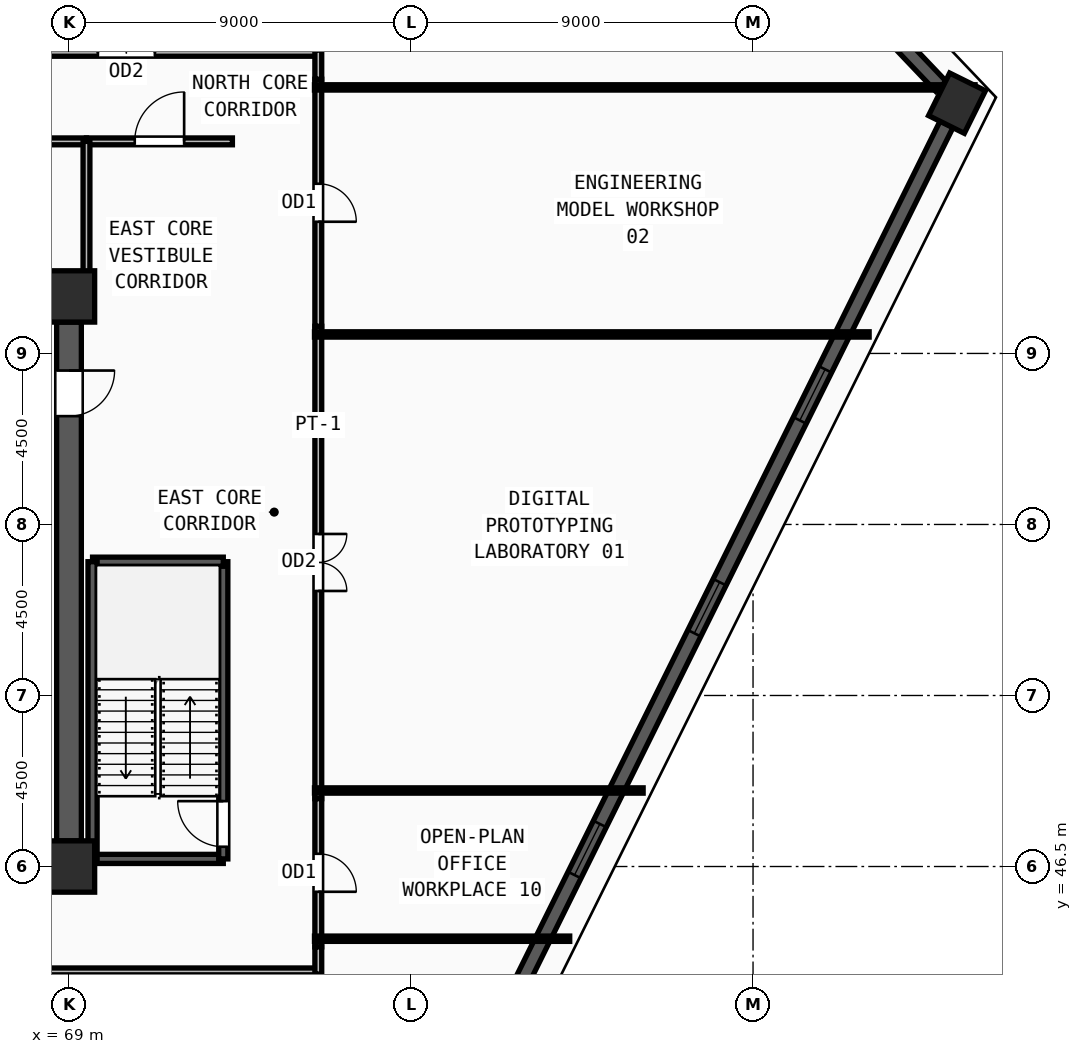
"""IFC4 building model, lengths in metres.
Left out: names, types, materials, properties, quantities, classifications, styles, units other than length and angle.
Written with IfcOpenShell. Run it as: python <this file> out.ifc"""

import sys

from ifc_helpers import new_model, si_unit, direction, frame, frame_2d, origin, origin_2d, place, context, subcontext, project, spatial, rectangle, extrude, source, transform, mapped, element, fill, save


model = new_model("IFC4")
c1 = context("Model", 3, precision=1e-05, world=origin(), true_north=direction((0.0, 1.0)))
c2 = subcontext(c1, "Body", "Model", "MODEL_VIEW")
j1 = project(units=[si_unit("LENGTHUNIT", "METRE"), si_unit("PLANEANGLEUNIT", "RADIAN")], contexts=[c1])
p1 = place(None, origin())
s1 = spatial("IfcSite", under=j1, at=p1, CompositionType="ELEMENT")
p2 = place(p1, origin())
s2 = spatial("IfcBuilding", under=s1, at=p2, CompositionType="ELEMENT")
p3 = place(p2, frame((0.0, 0.0, 236.25)))
s3 = spatial("IfcBuildingStorey", under=s2, at=p3, CompositionType="ELEMENT", Elevation=236.25)
m1 = source(origin(), c2, "Body", "SweptSolid", [
    extrude(rectangle(XDim=1.35, YDim=1.35, at=origin_2d()), origin(), (0.0, 0.0, 1.0), 3.75),
])
for number, where, z_axis, x_axis in (
    (1, (69.0, 46.5, 0.0), (0.0, 0.0, 1.0), (1.0, 0.0, 0.0)),
    (2, (69.0, 61.5, 0.0), (0.0, 0.0, 1.0), (1.0, 0.0, 0.0)),
):
    element("IfcColumn", number, at=place(p3, frame(where, z_axis=z_axis, x_axis=x_axis)), inside=s3, PredefinedType="COLUMN", context=c2, shape_type="MappedRepresentation", body=[
        mapped(m1, transform((0.0, 0.0, 0.0), x_axis=(1.0, 0.0, 0.0), y_axis=(0.0, 1.0, 0.0), z_axis=(0.0, 0.0, 1.0), scale=1.0)),
    ])
m2 = source(origin(), c2, "Body", "SweptSolid", [
    extrude(rectangle(XDim=1.25, YDim=1.05, at=origin_2d()), origin(), (0.0, 0.0, 1.0), 3.75),
])
p4 = place(p3, frame((92.367, 66.585, 0.0), z_axis=(0.0, 0.0, 1.0), x_axis=(0.444009746106, 0.896021955849, 0.0)))
e3 = element("IfcColumn", 3, at=p4, inside=s3, PredefinedType="COLUMN", context=c2, shape_type="MappedRepresentation", body=[
    mapped(m2, transform((0.0, 0.0, 0.0), x_axis=(1.0, 0.0, 0.0), y_axis=(0.0, 1.0, 0.0), z_axis=(0.0, 0.0, 1.0), scale=1.0)),
])
p5 = place(p3, frame((79.483, 40.585, 0.0), z_axis=(0.0, 0.0, 1.0), x_axis=(0.444016540866, 0.896018588779, 0.0)))
e4 = element("IfcWall", 4, at=p5, inside=s3, PredefinedType="SOLIDWALL", context=c2, shape_type="SweptSolid", body=[
    extrude(rectangle(XDim=28.402, YDim=0.38, at=frame_2d((14.201, 0.0))), origin(), (0.0, 0.0, 1.0), 3.57),
])
m3 = source(origin(), c2, "Body", "SweptSolid", [
    extrude(rectangle(XDim=1.5, YDim=1.9, at=frame_2d((0.75, 0.95))), frame((0.0, 0.2, 0.0), z_axis=(0.0, -1.0, 0.0), x_axis=(1.0, 0.0, 0.0)), (0.0, 0.0, 1.0), 0.4),
])
p6 = place(p5, frame((6.351, 0.0, 0.55)))
e5 = element("IfcOpeningElement", 5, at=p6, cuts=e4, PredefinedType="OPENING", context=c2, shape_type="MappedRepresentation", body=[
    mapped(m3, transform((0.0, 0.0, 0.0), x_axis=(1.0, 0.0, 0.0), y_axis=(0.0, 1.0, 0.0), z_axis=(0.0, 0.0, 1.0), scale=1.0)),
])
p7 = place(p5, frame((13.451, 0.0, 0.55)))
e6 = element("IfcOpeningElement", 6, at=p7, cuts=e4, PredefinedType="OPENING", context=c2, shape_type="MappedRepresentation", body=[
    mapped(m3, transform((0.0, 0.0, 0.0), x_axis=(1.0, 0.0, 0.0), y_axis=(0.0, 1.0, 0.0), z_axis=(0.0, 0.0, 1.0), scale=1.0)),
])
p8 = place(p5, frame((19.702, 0.0, 0.55)))
e7 = element("IfcOpeningElement", 7, at=p8, cuts=e4, PredefinedType="OPENING", context=c2, shape_type="MappedRepresentation", body=[
    mapped(m3, transform((0.0, 0.0, 0.0), x_axis=(1.0, 0.0, 0.0), y_axis=(0.0, 1.0, 0.0), z_axis=(0.0, 0.0, 1.0), scale=1.0)),
])
p9 = place(p3, frame((91.943, 67.031, 0.0), z_axis=(0.0, 0.0, 1.0), x_axis=(-0.689450799111, 0.724332517291, 0.0)))
e8 = element("IfcWall", 8, at=p9, inside=s3, PredefinedType="SOLIDWALL", context=c2, shape_type="SweptSolid", body=[
    extrude(rectangle(XDim=4.207, YDim=0.38, at=frame_2d((2.103, 0.0))), origin(), (0.0, 0.0, 1.0), 3.57),
])
m4 = source(origin(), c2, "Body", "SweptSolid", [
    extrude(rectangle(XDim=1.2, YDim=1.9, at=frame_2d((0.6, 0.95))), frame((0.0, 0.2, 0.0), z_axis=(0.0, -1.0, 0.0), x_axis=(1.0, 0.0, 0.0)), (0.0, 0.0, 1.0), 0.4),
])
p10 = place(p9, frame((1.503, 0.0, 0.55)))
e9 = element("IfcOpeningElement", 9, at=p10, cuts=e8, PredefinedType="OPENING", context=c2, shape_type="MappedRepresentation", body=[
    mapped(m4, transform((0.0, 0.0, 0.0), x_axis=(1.0, 0.0, 0.0), y_axis=(0.0, 1.0, 0.0), z_axis=(0.0, 0.0, 1.0), scale=1.0)),
])
p11 = place(p3, frame((69.0, 60.825, 0.0), z_axis=(0.0, 0.0, 1.0), x_axis=(0.0, -1.0, 0.0)))
e10 = element("IfcWall", 10, at=p11, inside=s3, PredefinedType="SHEAR", context=c2, shape_type="SweptSolid", body=[
    extrude(rectangle(XDim=13.65, YDim=0.65, at=frame_2d((6.825, 0.0))), origin(), (0.0, 0.0, 1.0), 3.57),
])
m5 = source(origin(), c2, "Body", "SweptSolid", [
    extrude(rectangle(XDim=1.2, YDim=2.2, at=frame_2d((0.6, 1.1))), frame((0.0, 0.335, 0.0), z_axis=(0.0, -1.0, 0.0), x_axis=(1.0, 0.0, 0.0)), (0.0, 0.0, 1.0), 0.67),
])
p12 = place(p11, frame((1.275, 0.0, 0.0)))
e11 = element("IfcOpeningElement", 11, at=p12, cuts=e10, PredefinedType="OPENING", context=c2, shape_type="MappedRepresentation", body=[
    mapped(m5, transform((0.0, 0.0, 0.0), x_axis=(1.0, 0.0, 0.0), y_axis=(0.0, 1.0, 0.0), z_axis=(0.0, 0.0, 1.0), scale=1.0)),
])
p13 = place(p3, frame((69.62, 46.7, 0.0), z_axis=(0.0, 0.0, 1.0), x_axis=(1.0, 0.0, 0.0)))
e12 = element("IfcWall", 12, at=p13, inside=s3, PredefinedType="SOLIDWALL", context=c2, shape_type="SweptSolid", body=[
    extrude(rectangle(XDim=3.44, YDim=0.24, at=frame_2d((1.72, 0.0))), origin(), (0.0, 0.0, 1.0), 3.57),
])
p14 = place(p3, frame((73.06, 46.7, 0.0), z_axis=(0.0, 0.0, 1.0), x_axis=(0.0, 1.0, 0.0)))
e13 = element("IfcWall", 13, at=p14, inside=s3, PredefinedType="SOLIDWALL", context=c2, shape_type="SweptSolid", body=[
    extrude(rectangle(XDim=7.82, YDim=0.24, at=frame_2d((3.91, 0.0))), origin(), (0.0, 0.0, 1.0), 3.57),
])
m6 = source(origin(), c2, "Body", "SweptSolid", [
    extrude(rectangle(XDim=1.2, YDim=2.2, at=frame_2d((0.6, 1.1))), frame((0.0, 0.13, 0.0), z_axis=(0.0, -1.0, 0.0), x_axis=(1.0, 0.0, 0.0)), (0.0, 0.0, 1.0), 0.26),
])
p15 = place(p14, frame((0.32, 0.0, 0.0)))
e14 = element("IfcOpeningElement", 14, at=p15, cuts=e13, PredefinedType="OPENING", context=c2, shape_type="MappedRepresentation", body=[
    mapped(m6, transform((0.0, 0.0, 0.0), x_axis=(1.0, 0.0, 0.0), y_axis=(0.0, 1.0, 0.0), z_axis=(0.0, 0.0, 1.0), scale=1.0)),
])
p16 = place(p3, frame((73.06, 54.52, 0.0), z_axis=(0.0, 0.0, 1.0), x_axis=(-1.0, 0.0, 0.0)))
e15 = element("IfcWall", 15, at=p16, inside=s3, PredefinedType="SOLIDWALL", context=c2, shape_type="SweptSolid", body=[
    extrude(rectangle(XDim=3.44, YDim=0.24, at=frame_2d((1.72, 0.0))), origin(), (0.0, 0.0, 1.0), 3.57),
])
p17 = place(p3, frame((69.62, 54.52, 0.0), z_axis=(0.0, 0.0, 1.0), x_axis=(0.0, -1.0, 0.0)))
e16 = element("IfcWall", 16, at=p17, inside=s3, PredefinedType="SOLIDWALL", context=c2, shape_type="SweptSolid", body=[
    extrude(rectangle(XDim=7.82, YDim=0.24, at=frame_2d((3.91, 0.0))), origin(), (0.0, 0.0, 1.0), 3.57),
])
p18 = place(p3, frame((62.39, 65.58, 0.0), z_axis=(0.0, 0.0, 1.0), x_axis=(1.0, 0.0, 0.0)))
e17 = element("IfcWall", 17, at=p18, inside=s3, PredefinedType="PARTITIONING", context=c2, shape_type="SweptSolid", body=[
    extrude(rectangle(XDim=7.07, YDim=0.18, at=frame_2d((3.535, 0.0))), origin(), (0.0, 0.0, 1.0), 3.57),
])
m7 = source(origin(), c2, "Body", "SweptSolid", [
    extrude(rectangle(XDim=1.0, YDim=2.2, at=frame_2d((0.5, 1.1))), frame((0.0, 0.1, 0.0), z_axis=(0.0, -1.0, 0.0), x_axis=(1.0, 0.0, 0.0)), (0.0, 0.0, 1.0), 0.2),
])
p19 = place(p18, frame((3.035, 0.0, 0.0)))
e18 = element("IfcOpeningElement", 18, at=p19, cuts=e17, PredefinedType="OPENING", context=c2, shape_type="MappedRepresentation", body=[
    mapped(m7, transform((0.0, 0.0, 0.0), x_axis=(1.0, 0.0, 0.0), y_axis=(0.0, 1.0, 0.0), z_axis=(0.0, 0.0, 1.0), scale=1.0)),
])
p20 = place(p3, frame((69.46, 65.58, 0.0), z_axis=(0.0, 0.0, 1.0), x_axis=(1.0, 0.0, 0.0)))
e19 = element("IfcWall", 19, at=p20, inside=s3, PredefinedType="PARTITIONING", context=c2, shape_type="SweptSolid", body=[
    extrude(rectangle(XDim=3.84, YDim=0.18, at=frame_2d((1.92, 0.0))), origin(), (0.0, 0.0, 1.0), 3.57),
])
m8 = source(origin(), c2, "Body", "SweptSolid", [
    extrude(rectangle(XDim=1.3, YDim=2.2, at=frame_2d((0.65, 1.1))), frame((0.0, 0.1, 0.0), z_axis=(0.0, -1.0, 0.0), x_axis=(1.0, 0.0, 0.0)), (0.0, 0.0, 1.0), 0.2),
])
p21 = place(p20, frame((1.27, 0.0, 0.0)))
e20 = element("IfcOpeningElement", 20, at=p21, cuts=e19, PredefinedType="OPENING", context=c2, shape_type="MappedRepresentation", body=[
    mapped(m8, transform((0.0, 0.0, 0.0), x_axis=(1.0, 0.0, 0.0), y_axis=(0.0, 1.0, 0.0), z_axis=(0.0, 0.0, 1.0), scale=1.0)),
])
p22 = place(p3, frame((75.56, 60.715, 0.0), z_axis=(0.0, 0.0, 1.0), x_axis=(0.0, -1.0, 0.0)))
e21 = element("IfcWall", 21, at=p22, inside=s3, PredefinedType="PARTITIONING", context=c2, shape_type="SweptSolid", body=[
    extrude(rectangle(XDim=12.43, YDim=0.18, at=frame_2d((6.215, 0.0))), origin(), (0.0, 0.0, 1.0), 3.57),
])
m9 = source(origin(), c2, "Body", "SweptSolid", [
    extrude(rectangle(XDim=1.5, YDim=2.2, at=frame_2d((0.75, 1.1))), frame((0.0, 0.1, 0.0), z_axis=(0.0, -1.0, 0.0), x_axis=(1.0, 0.0, 0.0)), (0.0, 0.0, 1.0), 0.2),
])
p23 = place(p22, frame((5.465, 0.0, 0.0)))
e22 = element("IfcOpeningElement", 22, at=p23, cuts=e21, PredefinedType="OPENING", context=c2, shape_type="MappedRepresentation", body=[
    mapped(m9, transform((0.0, 0.0, 0.0), x_axis=(1.0, 0.0, 0.0), y_axis=(0.0, 1.0, 0.0), z_axis=(0.0, 0.0, 1.0), scale=1.0)),
])
p24 = place(p3, frame((75.56, 67.215, 0.0), z_axis=(0.0, 0.0, 1.0), x_axis=(0.0, -1.0, 0.0)))
e23 = element("IfcWall", 23, at=p24, inside=s3, PredefinedType="PARTITIONING", context=c2, shape_type="SweptSolid", body=[
    extrude(rectangle(XDim=6.5, YDim=0.18, at=frame_2d((3.25, 0.0))), origin(), (0.0, 0.0, 1.0), 3.57),
])
p25 = place(p24, frame((2.75, 0.0, 0.0)))
e24 = element("IfcOpeningElement", 24, at=p25, cuts=e23, PredefinedType="OPENING", context=c2, shape_type="MappedRepresentation", body=[
    mapped(m7, transform((0.0, 0.0, 0.0), x_axis=(1.0, 0.0, 0.0), y_axis=(0.0, 1.0, 0.0), z_axis=(0.0, 0.0, 1.0), scale=1.0)),
])
p26 = place(p3, frame((65.39, 67.91, 0.0), z_axis=(0.0, 0.0, 1.0), x_axis=(1.0, 0.0, 0.0)))
e25 = element("IfcWall", 25, at=p26, inside=s3, PredefinedType="PARTITIONING", context=c2, shape_type="SweptSolid", body=[
    extrude(rectangle(XDim=10.24, YDim=0.18, at=frame_2d((5.12, 0.0))), origin(), (0.0, 0.0, 1.0), 3.205),
])
p27 = place(p26, frame((4.37, 0.0, 0.0)))
e26 = element("IfcOpeningElement", 26, at=p27, cuts=e25, PredefinedType="OPENING", context=c2, shape_type="MappedRepresentation", body=[
    mapped(m9, transform((0.0, 0.0, 0.0), x_axis=(1.0, 0.0, 0.0), y_axis=(0.0, 1.0, 0.0), z_axis=(0.0, 0.0, 1.0), scale=1.0)),
])
p28 = place(p3, frame((75.63, 43.74, 0.0), z_axis=(0.0, 0.0, 1.0), x_axis=(-1.0, 0.0, 0.0)))
e27 = element("IfcWall", 27, at=p28, inside=s3, PredefinedType="PARTITIONING", context=c2, shape_type="SweptSolid", body=[
    extrude(rectangle(XDim=31.26, YDim=0.18, at=frame_2d((15.63, 0.0))), origin(), (0.0, 0.0, 1.0), 3.57),
])
p29 = place(p28, frame((10.38, 0.0, 0.0)))
e28 = element("IfcOpeningElement", 28, at=p29, cuts=e27, PredefinedType="OPENING", context=c2, shape_type="MappedRepresentation", body=[
    mapped(m9, transform((0.0, 0.0, 0.0), x_axis=(1.0, 0.0, 0.0), y_axis=(0.0, 1.0, 0.0), z_axis=(0.0, 0.0, 1.0), scale=1.0)),
])
p30 = place(p3, frame((75.56, 48.285, 0.0), z_axis=(0.0, 0.0, 1.0), x_axis=(0.0, -1.0, 0.0)))
e29 = element("IfcWall", 29, at=p30, inside=s3, PredefinedType="PARTITIONING", context=c2, shape_type="SweptSolid", body=[
    extrude(rectangle(XDim=3.9, YDim=0.18, at=frame_2d((1.95, 0.0))), origin(), (0.0, 0.0, 1.0), 3.57),
])
p31 = place(p30, frame((1.45, 0.0, 0.0)))
e30 = element("IfcOpeningElement", 30, at=p31, cuts=e29, PredefinedType="OPENING", context=c2, shape_type="MappedRepresentation", body=[
    mapped(m7, transform((0.0, 0.0, 0.0), x_axis=(1.0, 0.0, 0.0), y_axis=(0.0, 1.0, 0.0), z_axis=(0.0, 0.0, 1.0), scale=1.0)),
])
p32 = place(p3, frame((69.46, 61.95, 0.0), z_axis=(0.0, 0.0, 1.0), x_axis=(0.0, 1.0, 0.0)))
e31 = element("IfcWall", 31, at=p32, inside=s3, PredefinedType="PARTITIONING", context=c2, shape_type="SweptSolid", body=[
    extrude(rectangle(XDim=3.63, YDim=0.18, at=frame_2d((1.815, 0.0))), origin(), (0.0, 0.0, 1.0), 3.57),
])
p33 = place(p3, frame((75.56, 67.98, 0.0), z_axis=(0.0, 0.0, 1.0), x_axis=(0.0, -1.0, 0.0)))
e32 = element("IfcWall", 32, at=p33, inside=s3, PredefinedType="PARTITIONING", context=c2, shape_type="SweptSolid", body=[
    extrude(rectangle(XDim=0.765, YDim=0.18, at=frame_2d((0.382, 0.0))), origin(), (0.0, 0.0, 1.0), 3.57),
])
p34 = place(p3, frame((75.56, 44.385, 0.0), z_axis=(0.0, 0.0, 1.0), x_axis=(0.0, -1.0, 0.0)))
e33 = element("IfcWall", 33, at=p34, inside=s3, PredefinedType="PARTITIONING", context=c2, shape_type="SweptSolid", body=[
    extrude(rectangle(XDim=0.715, YDim=0.18, at=frame_2d((0.357, 0.0))), origin(), (0.0, 0.0, 1.0), 3.57),
])
p35 = place(p3, frame((75.46, 44.6, 0.0), z_axis=(0.0, 0.0, 1.0), x_axis=(1.0, 0.0, 0.0)))
e34 = element("IfcWall", 34, at=p35, inside=s3, PredefinedType="PARTITIONING", context=c2, shape_type="SweptSolid", body=[
    extrude(rectangle(XDim=6.716, YDim=0.14, at=frame_2d((3.358, 0.0))), origin(), (0.0, 0.0, 1.0), 3.57),
])
p36 = place(p3, frame((75.46, 48.5, 0.0), z_axis=(0.0, 0.0, 1.0), x_axis=(1.0, 0.0, 0.0)))
e35 = element("IfcWall", 35, at=p36, inside=s3, PredefinedType="PARTITIONING", context=c2, shape_type="SweptSolid", body=[
    extrude(rectangle(XDim=8.648, YDim=0.14, at=frame_2d((4.324, 0.0))), origin(), (0.0, 0.0, 1.0), 3.57),
])
p37 = place(p3, frame((75.46, 60.5, 0.0), z_axis=(0.0, 0.0, 1.0), x_axis=(1.0, 0.0, 0.0)))
e36 = element("IfcWall", 36, at=p37, inside=s3, PredefinedType="PARTITIONING", context=c2, shape_type="SweptSolid", body=[
    extrude(rectangle(XDim=14.595, YDim=0.14, at=frame_2d((7.297, 0.0))), origin(), (0.0, 0.0, 1.0), 3.57),
])
p38 = place(p3, frame((75.46, 67.0, 0.0), z_axis=(0.0, 0.0, 1.0), x_axis=(1.0, 0.0, 0.0)))
e37 = element("IfcWall", 37, at=p38, inside=s3, PredefinedType="PARTITIONING", context=c2, shape_type="SweptSolid", body=[
    extrude(rectangle(XDim=17.382, YDim=0.14, at=frame_2d((8.691, 0.0))), origin(), (0.0, 0.0, 1.0), 3.57),
])
m10 = source(origin(), c2, "Body", "SweptSolid", [
    extrude(rectangle(XDim=1.5, YDim=1.9, at=frame_2d((0.75, 0.95))), frame((0.0, 0.03, 0.0), z_axis=(0.0, -1.0, 0.0), x_axis=(1.0, 0.0, 0.0)), (0.0, 0.0, 1.0), 0.06),
])
p39 = place(p6, origin())
e38 = element("IfcWindow", 38, at=p39, inside=s3, PartitioningType="DOUBLE_PANEL_VERTICAL", PredefinedType="WINDOW", context=c2, shape_type="MappedRepresentation", body=[
    mapped(m10, transform((0.0, 0.0, 0.0), x_axis=(1.0, 0.0, 0.0), y_axis=(0.0, 1.0, 0.0), z_axis=(0.0, 0.0, 1.0), scale=1.0)),
])
fill(e5, e38)
p40 = place(p7, origin())
e39 = element("IfcWindow", 39, at=p40, inside=s3, PartitioningType="DOUBLE_PANEL_VERTICAL", PredefinedType="WINDOW", context=c2, shape_type="MappedRepresentation", body=[
    mapped(m10, transform((0.0, 0.0, 0.0), x_axis=(1.0, 0.0, 0.0), y_axis=(0.0, 1.0, 0.0), z_axis=(0.0, 0.0, 1.0), scale=1.0)),
])
fill(e6, e39)
p41 = place(p8, origin())
e40 = element("IfcWindow", 40, at=p41, inside=s3, PartitioningType="DOUBLE_PANEL_VERTICAL", PredefinedType="WINDOW", context=c2, shape_type="MappedRepresentation", body=[
    mapped(m10, transform((0.0, 0.0, 0.0), x_axis=(1.0, 0.0, 0.0), y_axis=(0.0, 1.0, 0.0), z_axis=(0.0, 0.0, 1.0), scale=1.0)),
])
fill(e7, e40)
m11 = source(origin(), c2, "Body", "SweptSolid", [
    extrude(rectangle(XDim=1.2, YDim=2.2, at=frame_2d((0.6, 1.1))), frame((0.0, 0.025, 0.0), z_axis=(0.0, -1.0, 0.0), x_axis=(1.0, 0.0, 0.0)), (0.0, 0.0, 1.0), 0.05),
])
p42 = place(p12, origin())
e41 = element("IfcDoor", 41, at=p42, inside=s3, OperationType="SINGLE_SWING_LEFT", PredefinedType="DOOR", context=c2, shape_type="MappedRepresentation", body=[
    mapped(m11, transform((0.0, 0.0, 0.0), x_axis=(1.0, 0.0, 0.0), y_axis=(0.0, 1.0, 0.0), z_axis=(0.0, 0.0, 1.0), scale=1.0)),
])
fill(e11, e41)
p43 = place(p15, origin())
e42 = element("IfcDoor", 42, at=p43, inside=s3, OperationType="SINGLE_SWING_RIGHT", PredefinedType="DOOR", context=c2, shape_type="MappedRepresentation", body=[
    mapped(m11, transform((0.0, 0.0, 0.0), x_axis=(1.0, 0.0, 0.0), y_axis=(0.0, 1.0, 0.0), z_axis=(0.0, 0.0, 1.0), scale=1.0)),
])
fill(e14, e42)
m12 = source(origin(), c2, "Body", "SweptSolid", [
    extrude(rectangle(XDim=1.3, YDim=2.2, at=frame_2d((0.65, 1.1))), frame((0.0, 0.025, 0.0), z_axis=(0.0, -1.0, 0.0), x_axis=(1.0, 0.0, 0.0)), (0.0, 0.0, 1.0), 0.05),
])
p44 = place(p21, origin())
e43 = element("IfcDoor", 43, at=p44, inside=s3, OperationType="SINGLE_SWING_RIGHT", PredefinedType="DOOR", context=c2, shape_type="MappedRepresentation", body=[
    mapped(m12, transform((0.0, 0.0, 0.0), x_axis=(1.0, 0.0, 0.0), y_axis=(0.0, 1.0, 0.0), z_axis=(0.0, 0.0, 1.0), scale=1.0)),
])
fill(e20, e43)
m13 = source(origin(), c2, "Body", "SweptSolid", [
    extrude(rectangle(XDim=1.5, YDim=2.2, at=frame_2d((0.75, 1.1))), frame((0.0, 0.025, 0.0), z_axis=(0.0, -1.0, 0.0), x_axis=(1.0, 0.0, 0.0)), (0.0, 0.0, 1.0), 0.05),
])
p45 = place(p23, origin())
e44 = element("IfcDoor", 44, at=p45, inside=s3, OperationType="DOUBLE_DOOR_SINGLE_SWING", PredefinedType="DOOR", context=c2, shape_type="MappedRepresentation", body=[
    mapped(m13, transform((0.0, 0.0, 0.0), x_axis=(1.0, 0.0, 0.0), y_axis=(0.0, 1.0, 0.0), z_axis=(0.0, 0.0, 1.0), scale=1.0)),
])
fill(e22, e44)
m14 = source(origin(), c2, "Body", "SweptSolid", [
    extrude(rectangle(XDim=1.0, YDim=2.2, at=frame_2d((0.5, 1.1))), frame((0.0, 0.025, 0.0), z_axis=(0.0, -1.0, 0.0), x_axis=(1.0, 0.0, 0.0)), (0.0, 0.0, 1.0), 0.05),
])
p46 = place(p25, origin())
e45 = element("IfcDoor", 45, at=p46, inside=s3, OperationType="SINGLE_SWING_RIGHT", PredefinedType="DOOR", context=c2, shape_type="MappedRepresentation", body=[
    mapped(m14, transform((0.0, 0.0, 0.0), x_axis=(1.0, 0.0, 0.0), y_axis=(0.0, 1.0, 0.0), z_axis=(0.0, 0.0, 1.0), scale=1.0)),
])
fill(e24, e45)
p47 = place(p27, origin())
e46 = element("IfcDoor", 46, at=p47, inside=s3, OperationType="DOUBLE_DOOR_SINGLE_SWING", PredefinedType="DOOR", context=c2, shape_type="MappedRepresentation", body=[
    mapped(m13, transform((0.0, 0.0, 0.0), x_axis=(1.0, 0.0, 0.0), y_axis=(0.0, 1.0, 0.0), z_axis=(0.0, 0.0, 1.0), scale=1.0)),
])
fill(e26, e46)
p48 = place(p31, origin())
e47 = element("IfcDoor", 47, at=p48, inside=s3, OperationType="SINGLE_SWING_RIGHT", PredefinedType="DOOR", context=c2, shape_type="MappedRepresentation", body=[
    mapped(m14, transform((0.0, 0.0, 0.0), x_axis=(1.0, 0.0, 0.0), y_axis=(0.0, 1.0, 0.0), z_axis=(0.0, 0.0, 1.0), scale=1.0)),
])
fill(e30, e47)
save(model, sys.argv[1])
